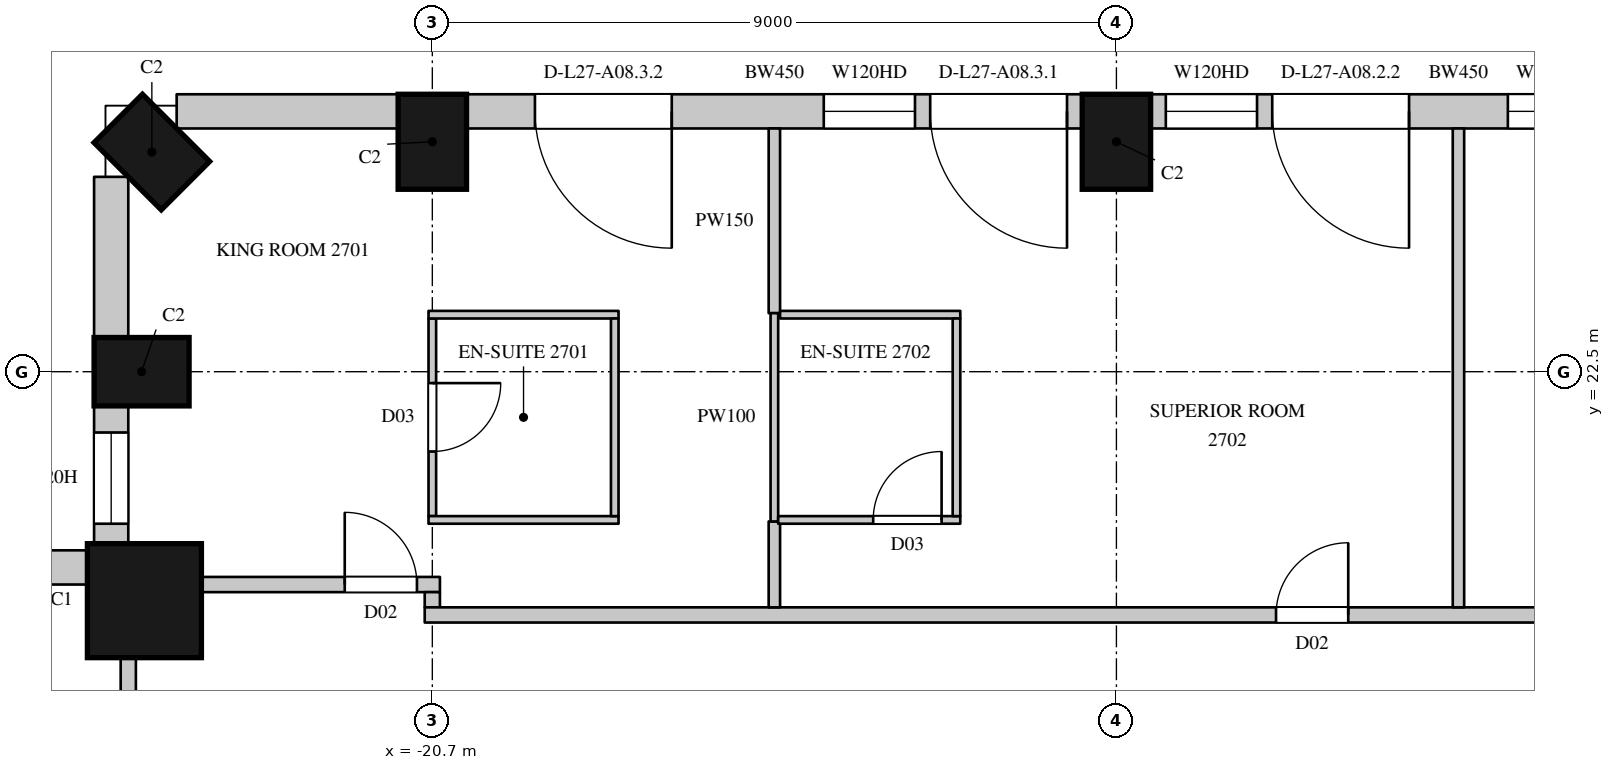
"""IFC4 building model, lengths in metres.
Left out: names, types, materials, properties, quantities, classifications, styles, units other than length and angle.
Written with IfcOpenShell. Run it as: python <this file> out.ifc"""

import sys

from ifc_helpers import new_model, si_unit, direction, frame, frame_2d, origin, origin_2d, place, context, subcontext, project, spatial, rectangle, circle, extrude, element, fill, save


model = new_model("IFC4")
c1 = context("Model", 3, precision=1e-05, world=origin(), true_north=direction((0.0, 1.0)))
c2 = subcontext(c1, "Body", "Model", "MODEL_VIEW")
j1 = project(units=[si_unit("LENGTHUNIT", "METRE"), si_unit("PLANEANGLEUNIT", "RADIAN")], contexts=[c1])
p1 = place(None, origin())
s1 = spatial("IfcSite", under=j1, at=p1, CompositionType="ELEMENT")
p2 = place(p1, origin())
s2 = spatial("IfcBuilding", under=s1, at=p2, CompositionType="ELEMENT")
p3 = place(p2, frame((0.0, 0.0, 127.5)))
s3 = spatial("IfcBuildingStorey", under=s2, at=p3, CompositionType="ELEMENT", Elevation=127.5)
for number, where, z_axis, x_axis in (
    (1, (-11.7, 25.525, 0.0), (0.0, 0.0, 1.0), (-1.0, 0.0, 0.0)),
    (2, (-20.7, 25.525, 0.0), (0.0, 0.0, 1.0), (-1.0, 0.0, 0.0)),
    (3, (-24.39, 25.39, 0.0), (0.0, 0.0, 1.0), (-0.707, -0.707, 0.0)),
    (4, (-24.525, 22.5, 0.0), (0.0, 0.0, 1.0), (0.0, -1.0, 0.0)),
):
    element("IfcColumn", number, at=place(p3, frame(where, z_axis=z_axis, x_axis=x_axis)), inside=s3, PredefinedType="COLUMN", context=c2, shape_type="SweptSolid", body=[
        extrude(rectangle(XDim=0.9, YDim=1.25, at=origin_2d()), origin(), (0.0, 0.0, 1.0), 3.6),
    ])
p4 = place(p3, frame((-24.488, 19.488, 0.0), z_axis=(0.0, 0.0, 1.0), x_axis=(1.0, 0.0, 0.0)))
e5 = element("IfcColumn", 5, at=p4, inside=s3, PredefinedType="COLUMN", context=c2, shape_type="SweptSolid", body=[
    extrude(circle(Radius=0.75, at=origin_2d()), origin(), (0.0, 0.0, 1.0), 3.6),
])
p5 = place(p3, frame((-3.15, 25.925, 0.0), z_axis=(0.0, 0.0, 1.0), x_axis=(-1.0, 0.0, 0.0)))
e6 = element("IfcWall", 6, at=p5, inside=s3, PredefinedType="SOLIDWALL", context=c2, shape_type="SweptSolid", body=[
    extrude(rectangle(XDim=8.1, YDim=0.45, at=frame_2d((4.05, 0.0))), origin(), (0.0, 0.0, 1.0), 3.3),
])
p6 = place(p5, frame((0.2, 0.0, 0.0)))
e7 = element("IfcOpeningElement", 7, at=p6, cuts=e6, PredefinedType="OPENING", context=c2, shape_type="SweptSolid", body=[
    extrude(rectangle(XDim=1.8, YDim=2.4, at=frame_2d((0.9, 1.2))), frame((0.0, 0.235, 0.0), z_axis=(0.0, -1.0, 0.0), x_axis=(1.0, 0.0, 0.0)), (0.0, 0.0, 1.0), 0.47),
])
p7 = place(p5, frame((2.2, 0.0, 1.05)))
e8 = element("IfcOpeningElement", 8, at=p7, cuts=e6, PredefinedType="OPENING", context=c2, shape_type="SweptSolid", body=[
    extrude(rectangle(XDim=1.2, YDim=2.0, at=frame_2d((0.6, 1.0))), frame((0.0, 0.235, 0.0), z_axis=(0.0, -1.0, 0.0), x_axis=(1.0, 0.0, 0.0)), (0.0, 0.0, 1.0), 0.47),
])
p8 = place(p5, frame((4.7, 0.0, 0.0)))
e9 = element("IfcOpeningElement", 9, at=p8, cuts=e6, PredefinedType="OPENING", context=c2, shape_type="SweptSolid", body=[
    extrude(rectangle(XDim=1.8, YDim=2.4, at=frame_2d((0.9, 1.2))), frame((0.0, 0.235, 0.0), z_axis=(0.0, -1.0, 0.0), x_axis=(1.0, 0.0, 0.0)), (0.0, 0.0, 1.0), 0.47),
])
p9 = place(p5, frame((6.7, 0.0, 1.05)))
e10 = element("IfcOpeningElement", 10, at=p9, cuts=e6, PredefinedType="OPENING", context=c2, shape_type="SweptSolid", body=[
    extrude(rectangle(XDim=1.2, YDim=2.0, at=frame_2d((0.6, 1.0))), frame((0.0, 0.235, 0.0), z_axis=(0.0, -1.0, 0.0), x_axis=(1.0, 0.0, 0.0)), (0.0, 0.0, 1.0), 0.47),
])
p10 = place(p3, frame((-12.15, 25.925, 0.0), z_axis=(0.0, 0.0, 1.0), x_axis=(-1.0, 0.0, 0.0)))
e11 = element("IfcWall", 11, at=p10, inside=s3, PredefinedType="SOLIDWALL", context=c2, shape_type="SweptSolid", body=[
    extrude(rectangle(XDim=8.1, YDim=0.45, at=frame_2d((4.05, 0.0))), origin(), (0.0, 0.0, 1.0), 3.3),
])
p11 = place(p10, frame((0.2, 0.0, 0.0)))
e12 = element("IfcOpeningElement", 12, at=p11, cuts=e11, PredefinedType="OPENING", context=c2, shape_type="SweptSolid", body=[
    extrude(rectangle(XDim=1.8, YDim=2.4, at=frame_2d((0.9, 1.2))), frame((0.0, 0.235, 0.0), z_axis=(0.0, -1.0, 0.0), x_axis=(1.0, 0.0, 0.0)), (0.0, 0.0, 1.0), 0.47),
])
p12 = place(p10, frame((2.2, 0.0, 1.05)))
e13 = element("IfcOpeningElement", 13, at=p12, cuts=e11, PredefinedType="OPENING", context=c2, shape_type="SweptSolid", body=[
    extrude(rectangle(XDim=1.2, YDim=2.0, at=frame_2d((0.6, 1.0))), frame((0.0, 0.235, 0.0), z_axis=(0.0, -1.0, 0.0), x_axis=(1.0, 0.0, 0.0)), (0.0, 0.0, 1.0), 0.47),
])
p13 = place(p10, frame((5.4, 0.0, 0.0)))
e14 = element("IfcOpeningElement", 14, at=p13, cuts=e11, PredefinedType="OPENING", context=c2, shape_type="SweptSolid", body=[
    extrude(rectangle(XDim=1.8, YDim=2.4, at=frame_2d((0.9, 1.2))), frame((0.0, 0.235, 0.0), z_axis=(0.0, -1.0, 0.0), x_axis=(1.0, 0.0, 0.0)), (0.0, 0.0, 1.0), 0.47),
])
p14 = place(p3, frame((-21.15, 25.925, 0.0), z_axis=(0.0, 0.0, 1.0), x_axis=(-1.0, 0.0, 0.0)))
e15 = element("IfcWall", 15, at=p14, inside=s3, PredefinedType="SOLIDWALL", context=c2, shape_type="SweptSolid", body=[
    extrude(rectangle(XDim=2.914, YDim=0.45, at=frame_2d((1.457, 0.0))), origin(), (0.0, 0.0, 1.0), 3.3),
])
p15 = place(p3, frame((-24.925, 25.064, 0.0), z_axis=(0.0, 0.0, 1.0), x_axis=(0.0, -1.0, 0.0)))
e16 = element("IfcWall", 16, at=p15, inside=s3, PredefinedType="SOLIDWALL", context=c2, shape_type="SweptSolid", body=[
    extrude(rectangle(XDim=2.114, YDim=0.45, at=frame_2d((1.057, 0.0))), origin(), (0.0, 0.0, 1.0), 3.3),
])
p16 = place(p3, frame((-24.925, 22.05, 0.0), z_axis=(0.0, 0.0, 1.0), x_axis=(0.0, -1.0, 0.0)))
e17 = element("IfcWall", 17, at=p16, inside=s3, PredefinedType="SOLIDWALL", context=c2, shape_type="SweptSolid", body=[
    extrude(rectangle(XDim=1.843, YDim=0.45, at=frame_2d((0.921, 0.0))), origin(), (0.0, 0.0, 1.0), 3.3),
])
p17 = place(p16, frame((0.35, 0.0, 1.05)))
e18 = element("IfcOpeningElement", 18, at=p17, cuts=e17, PredefinedType="OPENING", context=c2, shape_type="SweptSolid", body=[
    extrude(rectangle(XDim=1.2, YDim=2.0, at=frame_2d((0.6, 1.0))), frame((0.0, 0.235, 0.0), z_axis=(0.0, -1.0, 0.0), x_axis=(1.0, 0.0, 0.0)), (0.0, 0.0, 1.0), 0.47),
])
p18 = place(p3, frame((-25.207, 19.925, 0.0), z_axis=(0.0, 0.0, 1.0), x_axis=(-1.0, 0.0, 0.0)))
e19 = element("IfcWall", 19, at=p18, inside=s3, PredefinedType="SOLIDWALL", context=c2, shape_type="SweptSolid", body=[
    extrude(rectangle(XDim=3.857, YDim=0.45, at=frame_2d((1.928, 0.0))), origin(), (0.0, 0.0, 1.0), 3.3),
])
p19 = place(p18, frame((0.643, 0.0, 1.05)))
e20 = element("IfcOpeningElement", 20, at=p19, cuts=e19, PredefinedType="OPENING", context=c2, shape_type="SweptSolid", body=[
    extrude(rectangle(XDim=2.7, YDim=2.0, at=frame_2d((1.35, 1.0))), frame((0.0, 0.235, 0.0), z_axis=(0.0, -1.0, 0.0), x_axis=(1.0, 0.0, 0.0)), (0.0, 0.0, 1.0), 0.47),
])
p20 = place(p3, frame((-24.7, 16.03, 0.0), z_axis=(0.0, 0.0, 1.0), x_axis=(0.0, 1.0, 0.0)))
e21 = element("IfcWall", 21, at=p20, inside=s3, PredefinedType="PARTITIONING", context=c2, shape_type="SweptSolid", body=[
    extrude(rectangle(XDim=2.722, YDim=0.2, at=frame_2d((1.361, 0.0))), origin(), (0.0, 0.0, 1.0), 3.3),
])
p21 = place(p20, frame((0.45, 0.0, 0.0)))
e22 = element("IfcOpeningElement", 22, at=p21, cuts=e21, PredefinedType="OPENING", context=c2, shape_type="SweptSolid", body=[
    extrude(rectangle(XDim=1.6, YDim=2.4, at=frame_2d((0.8, 1.2))), frame((0.0, 0.11, 0.0), z_axis=(0.0, -1.0, 0.0), x_axis=(1.0, 0.0, 0.0)), (0.0, 0.0, 1.0), 0.22),
])
p22 = place(p3, frame((-23.752, 19.7, 0.0), z_axis=(0.0, 0.0, 1.0), x_axis=(1.0, 0.0, 0.0)))
e23 = element("IfcWall", 23, at=p22, inside=s3, PredefinedType="PARTITIONING", context=c2, shape_type="SweptSolid", body=[
    extrude(rectangle(XDim=3.152, YDim=0.2, at=frame_2d((1.576, 0.0))), origin(), (0.0, 0.0, 1.0), 3.3),
])
p23 = place(p22, frame((1.9, 0.0, 0.0)))
e24 = element("IfcOpeningElement", 24, at=p23, cuts=e23, PredefinedType="OPENING", context=c2, shape_type="SweptSolid", body=[
    extrude(rectangle(XDim=0.95, YDim=2.2, at=frame_2d((0.475, 1.1))), frame((0.0, 0.11, 0.0), z_axis=(0.0, -1.0, 0.0), x_axis=(1.0, 0.0, 0.0)), (0.0, 0.0, 1.0), 0.22),
])
p24 = place(p3, frame((-20.7, 19.4, 0.0), z_axis=(0.0, 0.0, 1.0), x_axis=(0.0, 1.0, 0.0)))
e25 = element("IfcWall", 25, at=p24, inside=s3, PredefinedType="PARTITIONING", context=c2, shape_type="SweptSolid", body=[
    extrude(rectangle(XDim=0.2, YDim=0.2, at=frame_2d((0.1, 0.0))), origin(), (0.0, 0.0, 1.0), 3.3),
])
p25 = place(p3, frame((-20.8, 19.3, 0.0), z_axis=(0.0, 0.0, 1.0), x_axis=(1.0, 0.0, 0.0)))
e26 = element("IfcWall", 26, at=p25, inside=s3, PredefinedType="PARTITIONING", context=c2, shape_type="SweptSolid", body=[
    extrude(rectangle(XDim=38.464, YDim=0.2, at=frame_2d((19.232, 0.0))), origin(), (0.0, 0.0, 1.0), 3.3),
])
p26 = place(p25, frame((24.05, 0.0, 0.0)))
e27 = element("IfcOpeningElement", 27, at=p26, cuts=e26, PredefinedType="OPENING", context=c2, shape_type="SweptSolid", body=[
    extrude(rectangle(XDim=0.9, YDim=2.2, at=frame_2d((0.45, 1.1))), frame((0.0, 0.11, 0.0), z_axis=(0.0, -1.0, 0.0), x_axis=(1.0, 0.0, 0.0)), (0.0, 0.0, 1.0), 0.22),
])
p27 = place(p25, frame((11.2, 0.0, 0.0)))
e28 = element("IfcOpeningElement", 28, at=p27, cuts=e26, PredefinedType="OPENING", context=c2, shape_type="SweptSolid", body=[
    extrude(rectangle(XDim=0.95, YDim=2.2, at=frame_2d((0.475, 1.1))), frame((0.0, 0.11, 0.0), z_axis=(0.0, -1.0, 0.0), x_axis=(1.0, 0.0, 0.0)), (0.0, 0.0, 1.0), 0.22),
])
p28 = place(p25, frame((15.05, 0.0, 0.0)))
e29 = element("IfcOpeningElement", 29, at=p28, cuts=e26, PredefinedType="OPENING", context=c2, shape_type="SweptSolid", body=[
    extrude(rectangle(XDim=0.95, YDim=2.2, at=frame_2d((0.475, 1.1))), frame((0.0, 0.11, 0.0), z_axis=(0.0, -1.0, 0.0), x_axis=(1.0, 0.0, 0.0)), (0.0, 0.0, 1.0), 0.22),
])
p29 = place(p25, frame((32.0, 0.0, 0.0)))
e30 = element("IfcOpeningElement", 30, at=p29, cuts=e26, PredefinedType="OPENING", context=c2, shape_type="SweptSolid", body=[
    extrude(rectangle(XDim=0.95, YDim=2.2, at=frame_2d((0.475, 1.1))), frame((0.0, 0.11, 0.0), z_axis=(0.0, -1.0, 0.0), x_axis=(1.0, 0.0, 0.0)), (0.0, 0.0, 1.0), 0.22),
])
p30 = place(p3, frame((-16.2, 19.4, 0.0), z_axis=(0.0, 0.0, 1.0), x_axis=(0.0, 1.0, 0.0)))
e31 = element("IfcWall", 31, at=p30, inside=s3, PredefinedType="PARTITIONING", context=c2, shape_type="SweptSolid", body=[
    extrude(rectangle(XDim=1.13, YDim=0.15, at=frame_2d((0.565, 0.0))), origin(), (0.0, 0.0, 1.0), 2.65),
])
p31 = place(p3, frame((-16.2, 23.27, 0.0), z_axis=(0.0, 0.0, 1.0), x_axis=(0.0, 1.0, 0.0)))
e32 = element("IfcWall", 32, at=p31, inside=s3, PredefinedType="PARTITIONING", context=c2, shape_type="SweptSolid", body=[
    extrude(rectangle(XDim=2.43, YDim=0.15, at=frame_2d((1.215, 0.0))), origin(), (0.0, 0.0, 1.0), 2.65),
])
p32 = place(p3, frame((-7.2, 19.4, 0.0), z_axis=(0.0, 0.0, 1.0), x_axis=(0.0, 1.0, 0.0)))
e33 = element("IfcWall", 33, at=p32, inside=s3, PredefinedType="PARTITIONING", context=c2, shape_type="SweptSolid", body=[
    extrude(rectangle(XDim=6.3, YDim=0.15, at=frame_2d((3.15, 0.0))), origin(), (0.0, 0.0, 1.0), 2.65),
])
p33 = place(p3, frame((-20.7, 20.6, 0.0), z_axis=(0.0, 0.0, 1.0), x_axis=(0.0, 1.0, 0.0)))
e34 = element("IfcWall", 34, at=p33, inside=s3, PredefinedType="PARTITIONING", context=c2, shape_type="SweptSolid", body=[
    extrude(rectangle(XDim=2.6, YDim=0.1, at=frame_2d((1.3, 0.0))), origin(), (0.0, 0.0, 1.0), 2.75),
])
p34 = place(p33, frame((0.85, 0.0, 0.0)))
e35 = element("IfcOpeningElement", 35, at=p34, cuts=e34, PredefinedType="OPENING", context=c2, shape_type="SweptSolid", body=[
    extrude(rectangle(XDim=0.9, YDim=2.2, at=frame_2d((0.45, 1.1))), frame((0.0, 0.06, 0.0), z_axis=(0.0, -1.0, 0.0), x_axis=(1.0, 0.0, 0.0)), (0.0, 0.0, 1.0), 0.12),
])
for number, where, z_axis, x_axis in (
    (36, (-20.75, 20.55, 0.0), (0.0, 0.0, 1.0), (1.0, 0.0, 0.0)),
    (37, (-20.75, 23.25, 0.0), (0.0, 0.0, 1.0), (1.0, 0.0, 0.0)),
):
    element("IfcWall", number, at=place(p3, frame(where, z_axis=z_axis, x_axis=x_axis)), inside=s3, PredefinedType="PARTITIONING", context=c2, shape_type="SweptSolid", body=[
        extrude(rectangle(XDim=2.5, YDim=0.1, at=frame_2d((1.25, 0.0))), origin(), (0.0, 0.0, 1.0), 3.3),
    ])
p35 = place(p3, frame((-18.3, 20.6, 0.0), z_axis=(0.0, 0.0, 1.0), x_axis=(0.0, 1.0, 0.0)))
e38 = element("IfcWall", 38, at=p35, inside=s3, PredefinedType="PARTITIONING", context=c2, shape_type="SweptSolid", body=[
    extrude(rectangle(XDim=2.6, YDim=0.1, at=frame_2d((1.3, 0.0))), origin(), (0.0, 0.0, 1.0), 3.3),
])
p36 = place(p3, frame((-16.2, 20.53, 0.0), z_axis=(0.0, 0.0, 1.0), x_axis=(0.0, 1.0, 0.0)))
e39 = element("IfcWall", 39, at=p36, inside=s3, PredefinedType="PARTITIONING", context=c2, shape_type="SweptSolid", body=[
    extrude(rectangle(XDim=2.74, YDim=0.1, at=frame_2d((1.37, 0.0))), origin(), (0.0, 0.0, 1.0), 2.65),
])
p37 = place(p3, frame((-16.15, 20.55, 0.0), z_axis=(0.0, 0.0, 1.0), x_axis=(1.0, 0.0, 0.0)))
e40 = element("IfcWall", 40, at=p37, inside=s3, PredefinedType="PARTITIONING", context=c2, shape_type="SweptSolid", body=[
    extrude(rectangle(XDim=2.396, YDim=0.1, at=frame_2d((1.198, 0.0))), origin(), (0.0, 0.0, 1.0), 3.3),
])
p38 = place(p37, frame((1.25, 0.0, 0.0)))
e41 = element("IfcOpeningElement", 41, at=p38, cuts=e40, PredefinedType="OPENING", context=c2, shape_type="SweptSolid", body=[
    extrude(rectangle(XDim=0.9, YDim=2.2, at=frame_2d((0.45, 1.1))), frame((0.0, 0.06, 0.0), z_axis=(0.0, -1.0, 0.0), x_axis=(1.0, 0.0, 0.0)), (0.0, 0.0, 1.0), 0.12),
])
p39 = place(p3, frame((-16.125, 23.25, 0.0), z_axis=(0.0, 0.0, 1.0), x_axis=(1.0, 0.0, 0.0)))
e42 = element("IfcWall", 42, at=p39, inside=s3, PredefinedType="PARTITIONING", context=c2, shape_type="SweptSolid", body=[
    extrude(rectangle(XDim=2.371, YDim=0.1, at=frame_2d((1.186, 0.0))), origin(), (0.0, 0.0, 1.0), 3.3),
])
p40 = place(p3, frame((-13.804, 20.6, 0.0), z_axis=(0.0, 0.0, 1.0), x_axis=(0.0, 1.0, 0.0)))
e43 = element("IfcWall", 43, at=p40, inside=s3, PredefinedType="PARTITIONING", context=c2, shape_type="SweptSolid", body=[
    extrude(rectangle(XDim=2.6, YDim=0.1, at=frame_2d((1.3, 0.0))), origin(), (0.0, 0.0, 1.0), 3.3),
])
p41 = place(p7, origin())
e44 = element("IfcWindow", 44, at=p41, inside=s3, PartitioningType="SINGLE_PANEL", PredefinedType="WINDOW", context=c2, shape_type="SweptSolid", body=[
    extrude(rectangle(XDim=1.2, YDim=2.0, at=frame_2d((0.6, 1.0))), frame((0.0, 0.135, 0.0), z_axis=(0.0, -1.0, 0.0), x_axis=(1.0, 0.0, 0.0)), (0.0, 0.0, 1.0), 0.06),
])
fill(e8, e44)
p42 = place(p8, origin())
e45 = element("IfcDoor", 45, at=p42, inside=s3, OperationType="SLIDING_TO_LEFT", PredefinedType="DOOR", context=c2, shape_type="SweptSolid", body=[
    extrude(rectangle(XDim=1.8, YDim=2.4, at=frame_2d((0.9, 1.2))), frame((0.0, 0.13, 0.0), z_axis=(0.0, -1.0, 0.0), x_axis=(1.0, 0.0, 0.0)), (0.0, 0.0, 1.0), 0.05),
])
fill(e9, e45)
p43 = place(p9, origin())
e46 = element("IfcWindow", 46, at=p43, inside=s3, PartitioningType="SINGLE_PANEL", PredefinedType="WINDOW", context=c2, shape_type="SweptSolid", body=[
    extrude(rectangle(XDim=1.2, YDim=2.0, at=frame_2d((0.6, 1.0))), frame((0.0, 0.135, 0.0), z_axis=(0.0, -1.0, 0.0), x_axis=(1.0, 0.0, 0.0)), (0.0, 0.0, 1.0), 0.06),
])
fill(e10, e46)
p44 = place(p11, origin())
e47 = element("IfcDoor", 47, at=p44, inside=s3, OperationType="SLIDING_TO_LEFT", PredefinedType="DOOR", context=c2, shape_type="SweptSolid", body=[
    extrude(rectangle(XDim=1.8, YDim=2.4, at=frame_2d((0.9, 1.2))), frame((0.0, 0.13, 0.0), z_axis=(0.0, -1.0, 0.0), x_axis=(1.0, 0.0, 0.0)), (0.0, 0.0, 1.0), 0.05),
])
fill(e12, e47)
p45 = place(p12, origin())
e48 = element("IfcWindow", 48, at=p45, inside=s3, PartitioningType="SINGLE_PANEL", PredefinedType="WINDOW", context=c2, shape_type="SweptSolid", body=[
    extrude(rectangle(XDim=1.2, YDim=2.0, at=frame_2d((0.6, 1.0))), frame((0.0, 0.135, 0.0), z_axis=(0.0, -1.0, 0.0), x_axis=(1.0, 0.0, 0.0)), (0.0, 0.0, 1.0), 0.06),
])
fill(e13, e48)
p46 = place(p13, origin())
e49 = element("IfcDoor", 49, at=p46, inside=s3, OperationType="SLIDING_TO_LEFT", PredefinedType="DOOR", context=c2, shape_type="SweptSolid", body=[
    extrude(rectangle(XDim=1.8, YDim=2.4, at=frame_2d((0.9, 1.2))), frame((0.0, 0.13, 0.0), z_axis=(0.0, -1.0, 0.0), x_axis=(1.0, 0.0, 0.0)), (0.0, 0.0, 1.0), 0.05),
])
fill(e14, e49)
p47 = place(p17, origin())
e50 = element("IfcWindow", 50, at=p47, inside=s3, PartitioningType="SINGLE_PANEL", PredefinedType="WINDOW", context=c2, shape_type="SweptSolid", body=[
    extrude(rectangle(XDim=1.2, YDim=2.0, at=frame_2d((0.6, 1.0))), frame((0.0, 0.135, 0.0), z_axis=(0.0, -1.0, 0.0), x_axis=(1.0, 0.0, 0.0)), (0.0, 0.0, 1.0), 0.06),
])
fill(e18, e50)
p48 = place(p23, origin())
e51 = element("IfcDoor", 51, at=p48, inside=s3, OperationType="SINGLE_SWING_LEFT", PredefinedType="DOOR", context=c2, shape_type="SweptSolid", body=[
    extrude(rectangle(XDim=0.95, YDim=2.2, at=frame_2d((0.475, 1.1))), frame((0.0, 0.025, 0.0), z_axis=(0.0, -1.0, 0.0), x_axis=(1.0, 0.0, 0.0)), (0.0, 0.0, 1.0), 0.05),
])
fill(e24, e51)
p49 = place(p34, origin())
e52 = element("IfcDoor", 52, at=p49, inside=s3, OperationType="SINGLE_SWING_LEFT", PredefinedType="DOOR", context=c2, shape_type="SweptSolid", body=[
    extrude(rectangle(XDim=0.9, YDim=2.2, at=frame_2d((0.45, 1.1))), frame((0.0, 0.025, 0.0), z_axis=(0.0, -1.0, 0.0), x_axis=(1.0, 0.0, 0.0)), (0.0, 0.0, 1.0), 0.05),
])
fill(e35, e52)
p50 = place(p27, origin())
e53 = element("IfcDoor", 53, at=p50, inside=s3, OperationType="SINGLE_SWING_RIGHT", PredefinedType="DOOR", context=c2, shape_type="SweptSolid", body=[
    extrude(rectangle(XDim=0.95, YDim=2.2, at=frame_2d((0.475, 1.1))), frame((0.0, 0.025, 0.0), z_axis=(0.0, -1.0, 0.0), x_axis=(1.0, 0.0, 0.0)), (0.0, 0.0, 1.0), 0.05),
])
fill(e28, e53)
p51 = place(p38, origin())
e54 = element("IfcDoor", 54, at=p51, inside=s3, OperationType="SINGLE_SWING_RIGHT", PredefinedType="DOOR", context=c2, shape_type="SweptSolid", body=[
    extrude(rectangle(XDim=0.9, YDim=2.2, at=frame_2d((0.45, 1.1))), frame((0.0, 0.025, 0.0), z_axis=(0.0, -1.0, 0.0), x_axis=(1.0, 0.0, 0.0)), (0.0, 0.0, 1.0), 0.05),
])
fill(e41, e54)
save(model, sys.argv[1])
